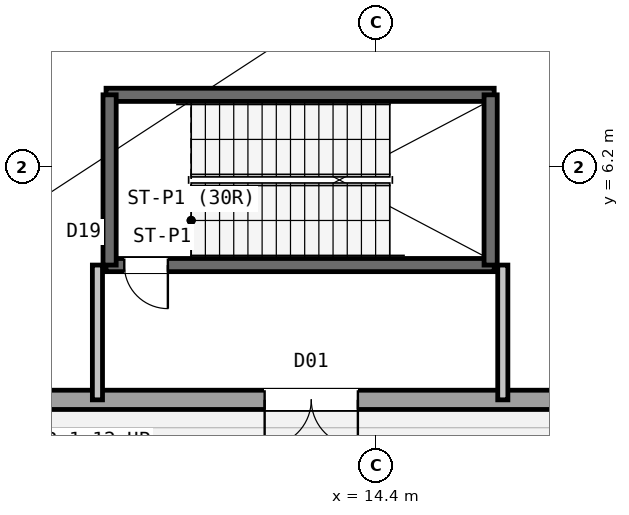
"""IFC4 building model, lengths in metres.
Left out: names, types, materials, properties, quantities, classifications, styles, units other than length and angle.
Written with IfcOpenShell. Run it as: python <this file> out.ifc"""

import sys

from ifc_helpers import new_model, si_unit, direction, frame, frame_2d, origin, place, context, subcontext, project, spatial, rectangle, extrude, source, transform, mapped, element, fill, save


model = new_model("IFC4")
c1 = context("Model", 3, precision=1e-05, world=origin(), true_north=direction((0.0, 1.0)))
c2 = subcontext(c1, "Body", "Model", "MODEL_VIEW")
j1 = project(units=[si_unit("LENGTHUNIT", "METRE"), si_unit("PLANEANGLEUNIT", "RADIAN")], contexts=[c1])
p1 = place(None, origin())
s1 = spatial("IfcSite", under=j1, at=p1, CompositionType="ELEMENT")
p2 = place(p1, origin())
s2 = spatial("IfcBuilding", under=s1, at=p2, CompositionType="ELEMENT")
p3 = place(p2, origin())
s3 = spatial("IfcBuildingStorey", under=s2, at=p3, CompositionType="ELEMENT", Elevation=0.0)
p4 = place(p3, frame((67.117, 1.6, 0.0), z_axis=(0.0, 0.0, 1.0), x_axis=(-1.0, 0.0, 0.0)))
e1 = element("IfcWall", 1, at=p4, inside=s3, PredefinedType="STANDARD", context=c2, shape_type="SweptSolid", body=[
    extrude(rectangle(XDim=62.234, YDim=0.38, at=frame_2d((31.117, 0.0))), origin(), (0.0, 0.0, 1.0), 3.755),
])
p5 = place(p4, frame((53.077, 0.0, 0.0)))
e2 = element("IfcOpeningElement", 2, at=p5, cuts=e1, PredefinedType="OPENING", context=c2, shape_type="SweptSolid", body=[
    extrude(rectangle(XDim=1.84, YDim=2.4, at=frame_2d((0.92, 1.2))), frame((0.0, 0.2, 0.0), z_axis=(0.0, -1.0, 0.0), x_axis=(1.0, 0.0, 0.0)), (0.0, 0.0, 1.0), 0.4),
])
p6 = place(p4, frame((39.517, 0.0, 0.0)))
e3 = element("IfcOpeningElement", 3, at=p6, cuts=e1, PredefinedType="OPENING", context=c2, shape_type="SweptSolid", body=[
    extrude(rectangle(XDim=2.2, YDim=2.6, at=frame_2d((1.1, 1.3))), frame((0.0, 0.2, 0.0), z_axis=(0.0, -1.0, 0.0), x_axis=(1.0, 0.0, 0.0)), (0.0, 0.0, 1.0), 0.4),
])
p7 = place(p4, frame((32.917, 0.0, 0.0)))
e4 = element("IfcOpeningElement", 4, at=p7, cuts=e1, PredefinedType="OPENING", context=c2, shape_type="SweptSolid", body=[
    extrude(rectangle(XDim=2.2, YDim=2.6, at=frame_2d((1.1, 1.3))), frame((0.0, 0.2, 0.0), z_axis=(0.0, -1.0, 0.0), x_axis=(1.0, 0.0, 0.0)), (0.0, 0.0, 1.0), 0.4),
])
p8 = place(p4, frame((26.997, 0.0, 0.0)))
e5 = element("IfcOpeningElement", 5, at=p8, cuts=e1, PredefinedType="OPENING", context=c2, shape_type="SweptSolid", body=[
    extrude(rectangle(XDim=1.84, YDim=2.4, at=frame_2d((0.92, 1.2))), frame((0.0, 0.2, 0.0), z_axis=(0.0, -1.0, 0.0), x_axis=(1.0, 0.0, 0.0)), (0.0, 0.0, 1.0), 0.4),
])
p9 = place(p4, frame((21.017, 0.0, 0.0)))
e6 = element("IfcOpeningElement", 6, at=p9, cuts=e1, PredefinedType="OPENING", context=c2, shape_type="SweptSolid", body=[
    extrude(rectangle(XDim=2.2, YDim=2.6, at=frame_2d((1.1, 1.3))), frame((0.0, 0.2, 0.0), z_axis=(0.0, -1.0, 0.0), x_axis=(1.0, 0.0, 0.0)), (0.0, 0.0, 1.0), 0.4),
])
p10 = place(p4, frame((17.297, 0.0, 0.0)))
e7 = element("IfcOpeningElement", 7, at=p10, cuts=e1, PredefinedType="OPENING", context=c2, shape_type="SweptSolid", body=[
    extrude(rectangle(XDim=1.84, YDim=2.4, at=frame_2d((0.92, 1.2))), frame((0.0, 0.2, 0.0), z_axis=(0.0, -1.0, 0.0), x_axis=(1.0, 0.0, 0.0)), (0.0, 0.0, 1.0), 0.4),
])
p11 = place(p4, frame((12.567, 0.0, 0.0)))
e8 = element("IfcOpeningElement", 8, at=p11, cuts=e1, PredefinedType="OPENING", context=c2, shape_type="SweptSolid", body=[
    extrude(rectangle(XDim=2.2, YDim=2.6, at=frame_2d((1.1, 1.3))), frame((0.0, 0.2, 0.0), z_axis=(0.0, -1.0, 0.0), x_axis=(1.0, 0.0, 0.0)), (0.0, 0.0, 1.0), 0.4),
])
p12 = place(p4, frame((6.277, 0.0, 0.0)))
e9 = element("IfcOpeningElement", 9, at=p12, cuts=e1, PredefinedType="OPENING", context=c2, shape_type="SweptSolid", body=[
    extrude(rectangle(XDim=1.84, YDim=2.4, at=frame_2d((0.92, 1.2))), frame((0.0, 0.2, 0.0), z_axis=(0.0, -1.0, 0.0), x_axis=(1.0, 0.0, 0.0)), (0.0, 0.0, 1.0), 0.4),
])
p13 = place(p3, frame((9.07, 7.62, 0.0), z_axis=(0.0, 0.0, 1.0), x_axis=(1.0, 0.0, 0.0)))
e10 = element("IfcWall", 10, at=p13, inside=s3, PredefinedType="SHEAR", context=c2, shape_type="SweptSolid", body=[
    extrude(rectangle(XDim=7.66, YDim=0.26, at=frame_2d((3.83, 0.0))), origin(), (0.0, 0.0, 1.0), 5.2),
])
p14 = place(p3, frame((9.07, 4.26, 0.0), z_axis=(0.0, 0.0, 1.0), x_axis=(1.0, 0.0, 0.0)))
e11 = element("IfcWall", 11, at=p14, inside=s3, PredefinedType="SHEAR", context=c2, shape_type="SweptSolid", body=[
    extrude(rectangle(XDim=7.66, YDim=0.26, at=frame_2d((3.83, 0.0))), origin(), (0.0, 0.0, 1.0), 5.2),
])
p15 = place(p14, frame((0.36, 0.0, 0.0)))
e12 = element("IfcOpeningElement", 12, at=p15, cuts=e11, PredefinedType="OPENING", context=c2, shape_type="SweptSolid", body=[
    extrude(rectangle(XDim=0.86, YDim=2.05, at=frame_2d((0.43, 1.025))), frame((0.0, 0.14, 0.0), z_axis=(0.0, -1.0, 0.0), x_axis=(1.0, 0.0, 0.0)), (0.0, 0.0, 1.0), 0.28),
])
for number, where, z_axis, x_axis in (
    (13, (9.14, 4.26, 0.0), (0.0, 0.0, 1.0), (0.0, 1.0, 0.0)),
    (14, (16.66, 4.26, 0.0), (0.0, 0.0, 1.0), (0.0, 1.0, 0.0)),
):
    element("IfcWall", number, at=place(p3, frame(where, z_axis=z_axis, x_axis=x_axis)), inside=s3, PredefinedType="SHEAR", context=c2, shape_type="SweptSolid", body=[
        extrude(rectangle(XDim=3.36, YDim=0.26, at=frame_2d((1.68, 0.0))), origin(), (0.0, 0.0, 1.0), 5.2),
    ])
for number, where, z_axis, x_axis in (
    (15, (8.9, 1.6, 0.0), (0.0, 0.0, 1.0), (0.0, 1.0, 0.0)),
    (16, (16.9, 1.6, 0.0), (0.0, 0.0, 1.0), (0.0, 1.0, 0.0)),
):
    element("IfcWall", number, at=place(p3, frame(where, z_axis=z_axis, x_axis=x_axis)), inside=s3, PredefinedType="STANDARD", context=c2, shape_type="SweptSolid", body=[
        extrude(rectangle(XDim=2.66, YDim=0.2, at=frame_2d((1.33, 0.0))), origin(), (0.0, 0.0, 1.0), 5.04),
    ])
m1 = source(origin(), c2, "Body", "SweptSolid", [
    extrude(rectangle(XDim=1.84, YDim=2.4, at=frame_2d((0.92, 1.2))), frame((0.0, 0.025, 0.0), z_axis=(0.0, -1.0, 0.0), x_axis=(1.0, 0.0, 0.0)), (0.0, 0.0, 1.0), 0.05),
])
p16 = place(p5, origin())
e17 = element("IfcDoor", 17, at=p16, inside=s3, OperationType="DOUBLE_DOOR_SINGLE_SWING", PredefinedType="DOOR", context=c2, shape_type="MappedRepresentation", body=[
    mapped(m1, transform((0.0, 0.0, 0.0), scale=1.0)),
])
fill(e2, e17)
m2 = source(origin(), c2, "Body", "SweptSolid", [
    extrude(rectangle(XDim=0.86, YDim=2.05, at=frame_2d((0.43, 1.025))), frame((0.0, 0.025, 0.0), z_axis=(0.0, -1.0, 0.0), x_axis=(1.0, 0.0, 0.0)), (0.0, 0.0, 1.0), 0.05),
])
p17 = place(p15, frame((0.86, 0.0, 0.0), z_axis=(0.0, 0.0, 1.0), x_axis=(-1.0, 0.0, 0.0)))
e18 = element("IfcDoor", 18, at=p17, inside=s3, OperationType="SINGLE_SWING_LEFT", PredefinedType="DOOR", context=c2, shape_type="MappedRepresentation", body=[
    mapped(m2, transform((0.0, 0.0, 0.0), scale=1.0)),
])
fill(e12, e18)
save(model, sys.argv[1])
